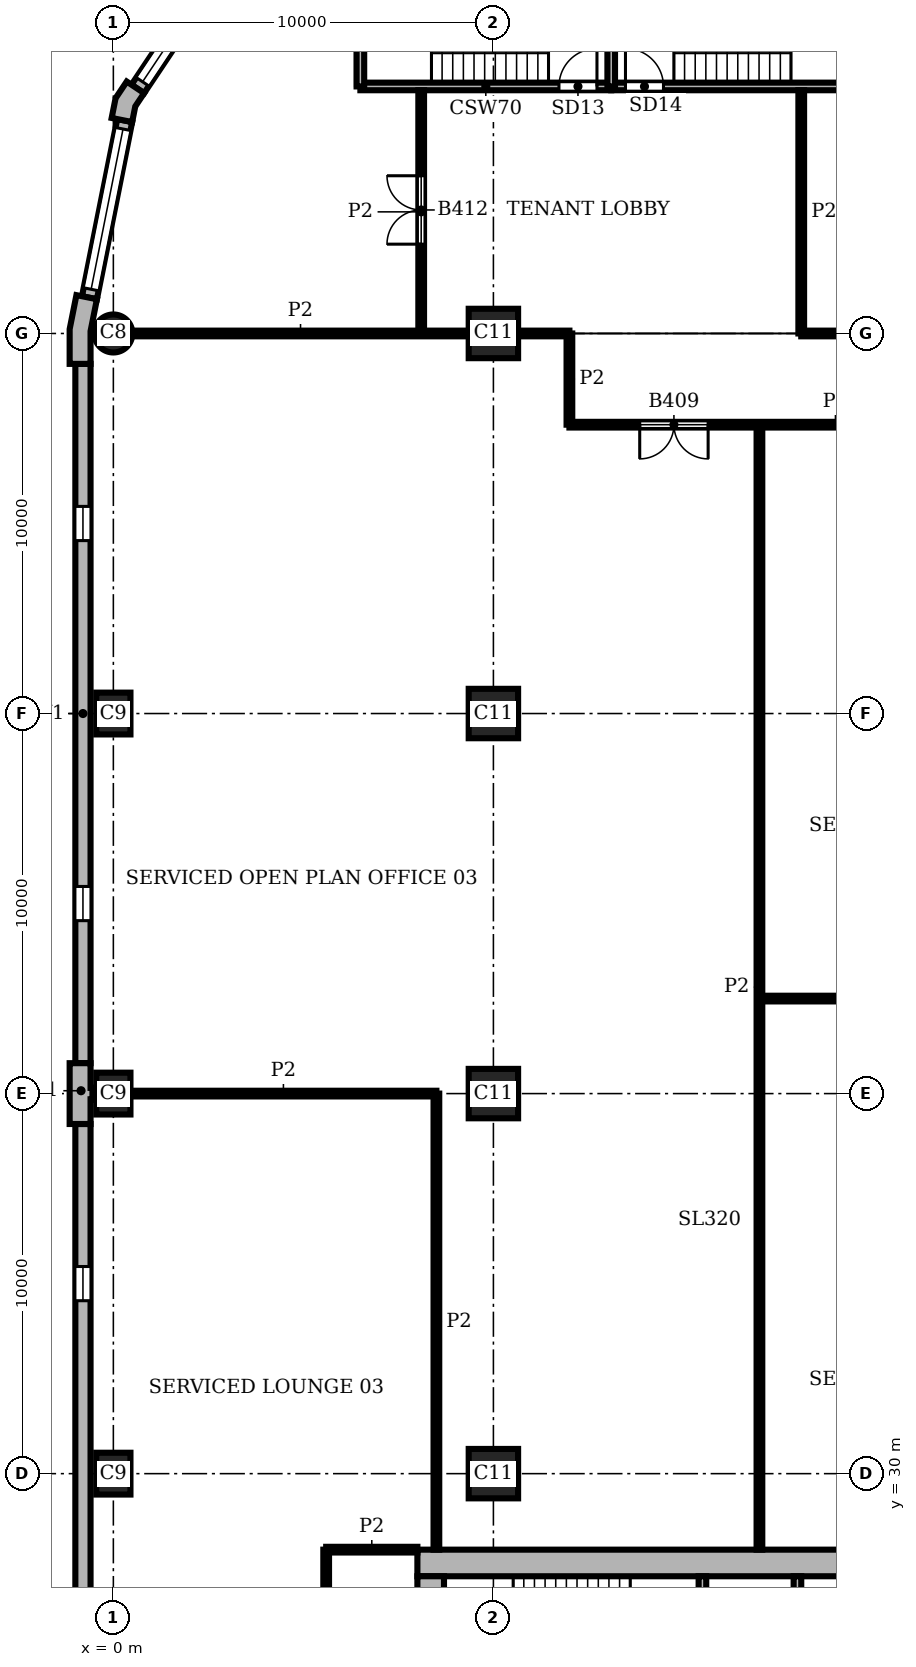
"""IFC4 building model, lengths in metres.
Left out: names, types, materials, properties, quantities, classifications, styles, units other than length and angle.
Written with IfcOpenShell. Run it as: python <this file> out.ifc"""

import sys

from ifc_helpers import new_model, si_unit, direction, frame, frame_2d, origin, origin_2d, place, context, subcontext, project, spatial, polyline, rectangle, circle, outline, extrude, element, fill, save


model = new_model("IFC4")
c1 = context("Model", 3, precision=1e-05, world=origin(), true_north=direction((0.0, 1.0)))
c2 = subcontext(c1, "Body", "Model", "MODEL_VIEW")
j1 = project(units=[si_unit("LENGTHUNIT", "METRE"), si_unit("PLANEANGLEUNIT", "RADIAN")], contexts=[c1])
p1 = place(None, origin())
s1 = spatial("IfcSite", under=j1, at=p1, CompositionType="ELEMENT")
p2 = place(p1, origin())
s2 = spatial("IfcBuilding", under=s1, at=p2, CompositionType="ELEMENT")
p3 = place(p2, frame((0.0, 0.0, 170.7)))
s3 = spatial("IfcBuildingStorey", under=s2, at=p3, CompositionType="ELEMENT", Elevation=170.7)
p4 = place(p3, frame((0.0, 60.0, 0.0), z_axis=(0.0, 0.0, 1.0), x_axis=(1.0, 0.0, 0.0)))
e1 = element("IfcColumn", 1, at=p4, inside=s3, PredefinedType="COLUMN", context=c2, shape_type="SweptSolid", body=[
    extrude(circle(Radius=0.5, at=origin_2d()), origin(), (0.0, 0.0, 1.0), 3.9),
])
for number, where, z_axis, x_axis in (
    (2, (0.0, 50.0, 0.0), (0.0, 0.0, 1.0), (0.0, 1.0, 0.0)),
    (3, (0.0, 40.0, 0.0), (0.0, 0.0, 1.0), (0.0, 1.0, 0.0)),
    (4, (0.0, 30.0, 0.0), (0.0, 0.0, 1.0), (0.0, 1.0, 0.0)),
):
    element("IfcColumn", number, at=place(p3, frame(where, z_axis=z_axis, x_axis=x_axis)), inside=s3, PredefinedType="COLUMN", context=c2, shape_type="SweptSolid", body=[
        extrude(rectangle(XDim=1.1, YDim=0.9, at=origin_2d()), origin(), (0.0, 0.0, 1.0), 3.9),
    ])
for number, where, z_axis, x_axis in (
    (5, (10.0, 30.0, 0.0), (0.0, 0.0, 1.0), (1.0, 0.0, 0.0)),
    (6, (10.0, 40.0, 0.0), (0.0, 0.0, 1.0), (1.0, 0.0, 0.0)),
    (7, (10.0, 50.0, 0.0), (0.0, 0.0, 1.0), (1.0, 0.0, 0.0)),
    (8, (10.0, 60.0, 0.0), (0.0, 0.0, 1.0), (1.0, 0.0, 0.0)),
):
    element("IfcColumn", number, at=place(p3, frame(where, z_axis=z_axis, x_axis=x_axis)), inside=s3, PredefinedType="COLUMN", context=c2, shape_type="SweptSolid", body=[
        extrude(rectangle(XDim=1.3, YDim=1.3, at=origin_2d()), origin(), (0.0, 0.0, 1.0), 3.9),
    ])
p5 = place(p3, frame((28.0, 27.65, 0.0), z_axis=(0.0, 0.0, 1.0), x_axis=(-1.0, 0.0, 0.0)))
e9 = element("IfcWall", 9, at=p5, inside=s3, PredefinedType="SHEAR", context=c2, shape_type="SweptSolid", body=[
    extrude(rectangle(XDim=20.0, YDim=0.7, at=frame_2d((10.0, 0.0))), origin(), (0.0, 0.0, 1.0), 3.9),
])
p6 = place(p3, frame((8.35, 27.3, 0.0), z_axis=(0.0, 0.0, 1.0), x_axis=(0.0, -1.0, 0.0)))
e10 = element("IfcWall", 10, at=p6, inside=s3, PredefinedType="SHEAR", context=c2, shape_type="SweptSolid", body=[
    extrude(rectangle(XDim=18.6, YDim=0.7, at=frame_2d((9.3, 0.0))), origin(), (0.0, 0.0, 1.0), 3.9),
])
p7 = place(p3, origin())
e11 = element("IfcWall", 11, at=p7, inside=s3, PredefinedType="SOLIDWALL", context=c2, shape_type="SweptSolid", body=[
    extrude(outline(polyline([(0.477, 66.545), (0.352, 66.629), (0.059, 66.189), (-0.045, 65.67), (0.103, 65.641), (0.495, 65.563), (0.577, 65.974), (0.81, 66.323), (0.477, 66.545)])), origin(), (0.0, 0.0, 1.0), 3.9),
])
e12 = element("IfcWall", 12, at=p7, inside=s3, PredefinedType="SOLIDWALL", context=c2, shape_type="SweptSolid", body=[
    extrude(outline(polyline([(-0.825, 60.98), (-0.972, 61.009), (-1.15, 60.113), (-1.15, 59.2), (-1.0, 59.2), (-0.6, 59.2), (-0.6, 60.059), (-0.432, 60.902), (-0.825, 60.98)])), origin(), (0.0, 0.0, 1.0), 3.9),
])
e13 = element("IfcWall", 13, at=p7, inside=s3, PredefinedType="SOLIDWALL", context=c2, shape_type="SweptSolid", body=[
    extrude(outline(polyline([(-0.6, 39.2), (-0.6, 39.85), (-0.55, 39.85), (-0.55, 40.15), (-0.6, 40.15), (-0.6, 40.8), (-1.0, 40.8), (-1.15, 40.8), (-1.15, 40.0), (-1.15, 39.2), (-1.0, 39.2), (-0.6, 39.2)])), origin(), (0.0, 0.0, 1.0), 3.9),
])
p8 = place(p3, frame((3.284, 70.386, 0.0), z_axis=(0.0, 0.0, 1.0), x_axis=(-0.555541552266, -0.831488775454, 0.0)))
e14 = element("IfcWall", 14, at=p8, inside=s3, PredefinedType="SOLIDWALL", context=c2, shape_type="SweptSolid", body=[
    extrude(rectangle(XDim=4.753, YDim=0.4, at=frame_2d((2.376, 0.0))), origin(), (0.0, 0.0, 1.0), 3.9),
])
p9 = place(p8, frame((0.226, 0.0, 0.9)))
e15 = element("IfcOpeningElement", 15, at=p9, cuts=e14, PredefinedType="OPENING", context=c2, shape_type="SweptSolid", body=[
    extrude(rectangle(XDim=4.3, YDim=2.35, at=frame_2d((2.15, 1.175))), frame((0.0, 0.21, 0.0), z_axis=(0.0, -1.0, 0.0), x_axis=(1.0, 0.0, 0.0)), (0.0, 0.0, 1.0), 0.42),
])
p10 = place(p3, frame((0.299, 65.602, 0.0), z_axis=(0.0, 0.0, 1.0), x_axis=(-0.195098533057, -0.98078364709, 0.0)))
e16 = element("IfcWall", 16, at=p10, inside=s3, PredefinedType="SOLIDWALL", context=c2, shape_type="SweptSolid", body=[
    extrude(rectangle(XDim=4.753, YDim=0.4, at=frame_2d((2.376, 0.0))), origin(), (0.0, 0.0, 1.0), 3.9),
])
p11 = place(p10, frame((0.226, 0.0, 0.9)))
e17 = element("IfcOpeningElement", 17, at=p11, cuts=e16, PredefinedType="OPENING", context=c2, shape_type="SweptSolid", body=[
    extrude(rectangle(XDim=4.3, YDim=2.35, at=frame_2d((2.15, 1.175))), frame((0.0, 0.21, 0.0), z_axis=(0.0, -1.0, 0.0), x_axis=(1.0, 0.0, 0.0)), (0.0, 0.0, 1.0), 0.42),
])
p12 = place(p3, frame((-0.8, 59.2, 0.0), z_axis=(0.0, 0.0, 1.0), x_axis=(0.0, -1.0, 0.0)))
e18 = element("IfcWall", 18, at=p12, inside=s3, PredefinedType="SOLIDWALL", context=c2, shape_type="SweptSolid", body=[
    extrude(rectangle(XDim=18.4, YDim=0.4, at=frame_2d((9.2, 0.0))), origin(), (0.0, 0.0, 1.0), 3.9),
])
p13 = place(p12, frame((3.75, 0.0, 0.9)))
e19 = element("IfcOpeningElement", 19, at=p13, cuts=e18, PredefinedType="OPENING", context=c2, shape_type="SweptSolid", body=[
    extrude(rectangle(XDim=0.9, YDim=2.35, at=frame_2d((0.45, 1.175))), frame((0.0, 0.21, 0.0), z_axis=(0.0, -1.0, 0.0), x_axis=(1.0, 0.0, 0.0)), (0.0, 0.0, 1.0), 0.42),
])
p14 = place(p12, frame((13.75, 0.0, 0.9)))
e20 = element("IfcOpeningElement", 20, at=p14, cuts=e18, PredefinedType="OPENING", context=c2, shape_type="SweptSolid", body=[
    extrude(rectangle(XDim=0.9, YDim=2.35, at=frame_2d((0.45, 1.175))), frame((0.0, 0.21, 0.0), z_axis=(0.0, -1.0, 0.0), x_axis=(1.0, 0.0, 0.0)), (0.0, 0.0, 1.0), 0.42),
])
p15 = place(p3, frame((-0.8, 39.2, 0.0), z_axis=(0.0, 0.0, 1.0), x_axis=(0.0, -1.0, 0.0)))
e21 = element("IfcWall", 21, at=p15, inside=s3, PredefinedType="SOLIDWALL", context=c2, shape_type="SweptSolid", body=[
    extrude(rectangle(XDim=18.4, YDim=0.4, at=frame_2d((9.2, 0.0))), origin(), (0.0, 0.0, 1.0), 3.9),
])
p16 = place(p15, frame((3.75, 0.0, 0.9)))
e22 = element("IfcOpeningElement", 22, at=p16, cuts=e21, PredefinedType="OPENING", context=c2, shape_type="SweptSolid", body=[
    extrude(rectangle(XDim=0.9, YDim=2.35, at=frame_2d((0.45, 1.175))), frame((0.0, 0.21, 0.0), z_axis=(0.0, -1.0, 0.0), x_axis=(1.0, 0.0, 0.0)), (0.0, 0.0, 1.0), 0.42),
])
p17 = place(p15, frame((13.75, 0.0, 0.9)))
e23 = element("IfcOpeningElement", 23, at=p17, cuts=e21, PredefinedType="OPENING", context=c2, shape_type="SweptSolid", body=[
    extrude(rectangle(XDim=0.9, YDim=2.35, at=frame_2d((0.45, 1.175))), frame((0.0, 0.21, 0.0), z_axis=(0.0, -1.0, 0.0), x_axis=(1.0, 0.0, 0.0)), (0.0, 0.0, 1.0), 0.42),
])
p18 = place(p3, frame((6.5, 66.5, 0.0), z_axis=(0.0, 0.0, 1.0), x_axis=(1.0, 0.0, 0.0)))
e24 = element("IfcWall", 24, at=p18, inside=s3, PredefinedType="SHEAR", context=c2, shape_type="SweptSolid", body=[
    extrude(rectangle(XDim=6.6, YDim=0.2, at=frame_2d((3.3, 0.0))), origin(), (0.0, 0.0, 1.0), 3.58),
])
p19 = place(p18, frame((5.225, 0.0, 0.0)))
e25 = element("IfcOpeningElement", 25, at=p19, cuts=e24, PredefinedType="OPENING", context=c2, shape_type="SweptSolid", body=[
    extrude(rectangle(XDim=1.0, YDim=2.1, at=frame_2d((0.5, 1.05))), frame((0.0, 0.11, 0.0), z_axis=(0.0, -1.0, 0.0), x_axis=(1.0, 0.0, 0.0)), (0.0, 0.0, 1.0), 0.22),
])
p20 = place(p3, frame((13.1, 66.5, 0.0), z_axis=(0.0, 0.0, 1.0), x_axis=(1.0, 0.0, 0.0)))
e26 = element("IfcWall", 26, at=p20, inside=s3, PredefinedType="SHEAR", context=c2, shape_type="SweptSolid", body=[
    extrude(rectangle(XDim=6.6, YDim=0.2, at=frame_2d((3.3, 0.0))), origin(), (0.0, 0.0, 1.0), 3.58),
])
p21 = place(p20, frame((0.375, 0.0, 0.0)))
e27 = element("IfcOpeningElement", 27, at=p21, cuts=e26, PredefinedType="OPENING", context=c2, shape_type="SweptSolid", body=[
    extrude(rectangle(XDim=1.0, YDim=2.1, at=frame_2d((0.5, 1.05))), frame((0.0, 0.11, 0.0), z_axis=(0.0, -1.0, 0.0), x_axis=(1.0, 0.0, 0.0)), (0.0, 0.0, 1.0), 0.22),
])
for number, where, z_axis, x_axis in (
    (28, (6.5, 66.5, 0.0), (0.0, 0.0, 1.0), (0.0, 1.0, 0.0)),
    (29, (13.1, 66.5, 0.0), (0.0, 0.0, 1.0), (0.0, 1.0, 0.0)),
):
    element("IfcWall", number, at=place(p3, frame(where, z_axis=z_axis, x_axis=x_axis)), inside=s3, PredefinedType="SHEAR", context=c2, shape_type="SweptSolid", body=[
        extrude(rectangle(XDim=3.3, YDim=0.2, at=frame_2d((1.65, 0.0))), origin(), (0.0, 0.0, 1.0), 3.58),
    ])
p22 = place(p3, frame((15.5, 23.6, 0.0), z_axis=(0.0, 0.0, 1.0), x_axis=(0.0, 1.0, 0.0)))
e30 = element("IfcWall", 30, at=p22, inside=s3, PredefinedType="SHEAR", context=c2, shape_type="SweptSolid", body=[
    extrude(rectangle(XDim=3.7, YDim=0.2, at=frame_2d((1.85, 0.0))), origin(), (0.0, 0.0, 1.0), 3.58),
])
p23 = place(p3, frame((18.0, 20.0, 0.0), z_axis=(0.0, 0.0, 1.0), x_axis=(0.0, 1.0, 0.0)))
e31 = element("IfcWall", 31, at=p23, inside=s3, PredefinedType="SHEAR", context=c2, shape_type="SweptSolid", body=[
    extrude(rectangle(XDim=7.3, YDim=0.2, at=frame_2d((3.65, 0.0))), origin(), (0.0, 0.0, 1.0), 3.58),
])
p24 = place(p23, frame((1.2, 0.0, 0.0)))
e32 = element("IfcOpeningElement", 32, at=p24, cuts=e31, PredefinedType="OPENING", context=c2, shape_type="SweptSolid", body=[
    extrude(rectangle(XDim=1.2, YDim=2.1, at=frame_2d((0.6, 1.05))), frame((0.0, 0.11, 0.0), z_axis=(0.0, -1.0, 0.0), x_axis=(1.0, 0.0, 0.0)), (0.0, 0.0, 1.0), 0.22),
])
p25 = place(p3, frame((5.6, 5.6, 0.0), z_axis=(0.0, 0.0, 1.0), x_axis=(0.0, 1.0, 0.0)))
e33 = element("IfcWall", 33, at=p25, inside=s3, PredefinedType="PARTITIONING", context=c2, shape_type="SweptSolid", body=[
    extrude(rectangle(XDim=22.4, YDim=0.15, at=frame_2d((11.2, 0.0))), origin(), (0.0, 0.0, 1.0), 3.58),
])
p26 = place(p25, frame((5.35, 0.0, 0.0)))
e34 = element("IfcOpeningElement", 34, at=p26, cuts=e33, PredefinedType="OPENING", context=c2, shape_type="SweptSolid", body=[
    extrude(rectangle(XDim=1.0, YDim=2.1, at=frame_2d((0.5, 1.05))), frame((0.0, 0.085, 0.0), z_axis=(0.0, -1.0, 0.0), x_axis=(1.0, 0.0, 0.0)), (0.0, 0.0, 1.0), 0.17),
])
p27 = place(p25, frame((11.25, 0.0, 0.0)))
e35 = element("IfcOpeningElement", 35, at=p27, cuts=e33, PredefinedType="OPENING", context=c2, shape_type="SweptSolid", body=[
    extrude(rectangle(XDim=1.0, YDim=2.1, at=frame_2d((0.5, 1.05))), frame((0.0, 0.085, 0.0), z_axis=(0.0, -1.0, 0.0), x_axis=(1.0, 0.0, 0.0)), (0.0, 0.0, 1.0), 0.17),
])
p28 = place(p25, frame((18.25, 0.0, 0.0)))
e36 = element("IfcOpeningElement", 36, at=p28, cuts=e33, PredefinedType="OPENING", context=c2, shape_type="SweptSolid", body=[
    extrude(rectangle(XDim=1.8, YDim=2.1, at=frame_2d((0.9, 1.05))), frame((0.0, 0.085, 0.0), z_axis=(0.0, -1.0, 0.0), x_axis=(1.0, 0.0, 0.0)), (0.0, 0.0, 1.0), 0.17),
])
p29 = place(p3, frame((8.1, 60.0, 0.0), z_axis=(0.0, 0.0, 1.0), x_axis=(0.0, 1.0, 0.0)))
e37 = element("IfcWall", 37, at=p29, inside=s3, PredefinedType="PARTITIONING", context=c2, shape_type="SweptSolid", body=[
    extrude(rectangle(XDim=6.4, YDim=0.15, at=frame_2d((3.2, 0.0))), origin(), (0.0, 0.0, 1.0), 3.58),
])
p30 = place(p29, frame((2.35, 0.0, 0.0)))
e38 = element("IfcOpeningElement", 38, at=p30, cuts=e37, PredefinedType="OPENING", context=c2, shape_type="SweptSolid", body=[
    extrude(rectangle(XDim=1.8, YDim=2.1, at=frame_2d((0.9, 1.05))), frame((0.0, 0.085, 0.0), z_axis=(0.0, -1.0, 0.0), x_axis=(1.0, 0.0, 0.0)), (0.0, 0.0, 1.0), 0.17),
])
p31 = place(p3, frame((8.5, 28.0, 0.0), z_axis=(0.0, 0.0, 1.0), x_axis=(0.0, 1.0, 0.0)))
e39 = element("IfcWall", 39, at=p31, inside=s3, PredefinedType="PARTITIONING", context=c2, shape_type="SweptSolid", body=[
    extrude(rectangle(XDim=12.0, YDim=0.15, at=frame_2d((6.0, 0.0))), origin(), (0.0, 0.0, 1.0), 3.58),
])
p32 = place(p3, frame((12.0, 57.6, 0.0), z_axis=(0.0, 0.0, 1.0), x_axis=(0.0, 1.0, 0.0)))
e40 = element("IfcWall", 40, at=p32, inside=s3, PredefinedType="PARTITIONING", context=c2, shape_type="SweptSolid", body=[
    extrude(rectangle(XDim=2.4, YDim=0.15, at=frame_2d((1.2, 0.0))), origin(), (0.0, 0.0, 1.0), 3.58),
])
p33 = place(p3, frame((17.0, 28.0, 0.0), z_axis=(0.0, 0.0, 1.0), x_axis=(0.0, 1.0, 0.0)))
e41 = element("IfcWall", 41, at=p33, inside=s3, PredefinedType="PARTITIONING", context=c2, shape_type="SweptSolid", body=[
    extrude(rectangle(XDim=29.6, YDim=0.15, at=frame_2d((14.8, 0.0))), origin(), (0.0, 0.0, 1.0), 3.58),
])
p34 = place(p3, frame((18.1, 60.0, 0.0), z_axis=(0.0, 0.0, 1.0), x_axis=(0.0, 1.0, 0.0)))
e42 = element("IfcWall", 42, at=p34, inside=s3, PredefinedType="PARTITIONING", context=c2, shape_type="SweptSolid", body=[
    extrude(rectangle(XDim=6.4, YDim=0.15, at=frame_2d((3.2, 0.0))), origin(), (0.0, 0.0, 1.0), 3.58),
])
p35 = place(p3, frame((5.6, 28.0, 0.0), z_axis=(0.0, 0.0, 1.0), x_axis=(1.0, 0.0, 0.0)))
e43 = element("IfcWall", 43, at=p35, inside=s3, PredefinedType="PARTITIONING", context=c2, shape_type="SweptSolid", body=[
    extrude(rectangle(XDim=2.4, YDim=0.15, at=frame_2d((1.2, 0.0))), origin(), (0.0, 0.0, 1.0), 3.58),
])
p36 = place(p3, frame((0.45, 40.0, 0.0), z_axis=(0.0, 0.0, 1.0), x_axis=(1.0, 0.0, 0.0)))
e44 = element("IfcWall", 44, at=p36, inside=s3, PredefinedType="PARTITIONING", context=c2, shape_type="SweptSolid", body=[
    extrude(rectangle(XDim=8.05, YDim=0.15, at=frame_2d((4.025, 0.0))), origin(), (0.0, 0.0, 1.0), 3.58),
])
p37 = place(p3, frame((17.0, 42.5, 0.0), z_axis=(0.0, 0.0, 1.0), x_axis=(1.0, 0.0, 0.0)))
e45 = element("IfcWall", 45, at=p37, inside=s3, PredefinedType="PARTITIONING", context=c2, shape_type="SweptSolid", body=[
    extrude(rectangle(XDim=9.0, YDim=0.15, at=frame_2d((4.5, 0.0))), origin(), (0.0, 0.0, 1.0), 3.58),
])
p38 = place(p3, frame((12.0, 57.6, 0.0), z_axis=(0.0, 0.0, 1.0), x_axis=(1.0, 0.0, 0.0)))
e46 = element("IfcWall", 46, at=p38, inside=s3, PredefinedType="PARTITIONING", context=c2, shape_type="SweptSolid", body=[
    extrude(rectangle(XDim=14.0, YDim=0.15, at=frame_2d((7.0, 0.0))), origin(), (0.0, 0.0, 1.0), 3.58),
])
p39 = place(p38, frame((1.85, 0.0, 0.0)))
e47 = element("IfcOpeningElement", 47, at=p39, cuts=e46, PredefinedType="OPENING", context=c2, shape_type="SweptSolid", body=[
    extrude(rectangle(XDim=1.8, YDim=2.1, at=frame_2d((0.9, 1.05))), frame((0.0, 0.085, 0.0), z_axis=(0.0, -1.0, 0.0), x_axis=(1.0, 0.0, 0.0)), (0.0, 0.0, 1.0), 0.17),
])
p40 = place(p3, frame((0.5, 60.0, 0.0), z_axis=(0.0, 0.0, 1.0), x_axis=(1.0, 0.0, 0.0)))
e48 = element("IfcWall", 48, at=p40, inside=s3, PredefinedType="PARTITIONING", context=c2, shape_type="SweptSolid", body=[
    extrude(rectangle(XDim=8.85, YDim=0.15, at=frame_2d((4.425, 0.0))), origin(), (0.0, 0.0, 1.0), 3.58),
])
p41 = place(p3, frame((10.65, 60.0, 0.0), z_axis=(0.0, 0.0, 1.0), x_axis=(1.0, 0.0, 0.0)))
e49 = element("IfcWall", 49, at=p41, inside=s3, PredefinedType="PARTITIONING", context=c2, shape_type="SweptSolid", body=[
    extrude(rectangle(XDim=1.35, YDim=0.15, at=frame_2d((0.675, 0.0))), origin(), (0.0, 0.0, 1.0), 3.58),
])
p42 = place(p3, frame((18.1, 60.0, 0.0), z_axis=(0.0, 0.0, 1.0), x_axis=(1.0, 0.0, 0.0)))
e50 = element("IfcWall", 50, at=p42, inside=s3, PredefinedType="PARTITIONING", context=c2, shape_type="SweptSolid", body=[
    extrude(rectangle(XDim=1.25, YDim=0.15, at=frame_2d((0.625, 0.0))), origin(), (0.0, 0.0, 1.0), 3.58),
])
p43 = place(p9, origin())
e51 = element("IfcWindow", 51, at=p43, inside=s3, PartitioningType="SINGLE_PANEL", PredefinedType="WINDOW", context=c2, shape_type="SweptSolid", body=[
    extrude(rectangle(XDim=4.3, YDim=2.35, at=frame_2d((2.15, 1.175))), frame((0.0, 0.16, 0.0), z_axis=(0.0, -1.0, 0.0), x_axis=(1.0, 0.0, 0.0)), (0.0, 0.0, 1.0), 0.06),
])
fill(e15, e51)
p44 = place(p11, origin())
e52 = element("IfcWindow", 52, at=p44, inside=s3, PartitioningType="SINGLE_PANEL", PredefinedType="WINDOW", context=c2, shape_type="SweptSolid", body=[
    extrude(rectangle(XDim=4.3, YDim=2.35, at=frame_2d((2.15, 1.175))), frame((0.0, 0.16, 0.0), z_axis=(0.0, -1.0, 0.0), x_axis=(1.0, 0.0, 0.0)), (0.0, 0.0, 1.0), 0.06),
])
fill(e17, e52)
p45 = place(p13, origin())
e53 = element("IfcWindow", 53, at=p45, inside=s3, PartitioningType="SINGLE_PANEL", PredefinedType="WINDOW", context=c2, shape_type="SweptSolid", body=[
    extrude(rectangle(XDim=0.9, YDim=2.35, at=frame_2d((0.45, 1.175))), frame((0.0, 0.16, 0.0), z_axis=(0.0, -1.0, 0.0), x_axis=(1.0, 0.0, 0.0)), (0.0, 0.0, 1.0), 0.06),
])
fill(e19, e53)
p46 = place(p14, origin())
e54 = element("IfcWindow", 54, at=p46, inside=s3, PartitioningType="SINGLE_PANEL", PredefinedType="WINDOW", context=c2, shape_type="SweptSolid", body=[
    extrude(rectangle(XDim=0.9, YDim=2.35, at=frame_2d((0.45, 1.175))), frame((0.0, 0.16, 0.0), z_axis=(0.0, -1.0, 0.0), x_axis=(1.0, 0.0, 0.0)), (0.0, 0.0, 1.0), 0.06),
])
fill(e20, e54)
p47 = place(p16, origin())
e55 = element("IfcWindow", 55, at=p47, inside=s3, PartitioningType="SINGLE_PANEL", PredefinedType="WINDOW", context=c2, shape_type="SweptSolid", body=[
    extrude(rectangle(XDim=0.9, YDim=2.35, at=frame_2d((0.45, 1.175))), frame((0.0, 0.16, 0.0), z_axis=(0.0, -1.0, 0.0), x_axis=(1.0, 0.0, 0.0)), (0.0, 0.0, 1.0), 0.06),
])
fill(e22, e55)
p48 = place(p19, origin())
e56 = element("IfcDoor", 56, at=p48, inside=s3, OperationType="SINGLE_SWING_RIGHT", PredefinedType="DOOR", context=c2, shape_type="SweptSolid", body=[
    extrude(rectangle(XDim=1.0, YDim=2.1, at=frame_2d((0.5, 1.05))), frame((0.0, 0.025, 0.0), z_axis=(0.0, -1.0, 0.0), x_axis=(1.0, 0.0, 0.0)), (0.0, 0.0, 1.0), 0.05),
])
fill(e25, e56)
p49 = place(p21, origin())
e57 = element("IfcDoor", 57, at=p49, inside=s3, OperationType="SINGLE_SWING_LEFT", PredefinedType="DOOR", context=c2, shape_type="SweptSolid", body=[
    extrude(rectangle(XDim=1.0, YDim=2.1, at=frame_2d((0.5, 1.05))), frame((0.0, 0.025, 0.0), z_axis=(0.0, -1.0, 0.0), x_axis=(1.0, 0.0, 0.0)), (0.0, 0.0, 1.0), 0.05),
])
fill(e27, e57)
p50 = place(p39, frame((1.8, 0.0, 0.0), z_axis=(0.0, 0.0, 1.0), x_axis=(-1.0, 0.0, 0.0)))
e58 = element("IfcDoor", 58, at=p50, inside=s3, OperationType="DOUBLE_DOOR_SINGLE_SWING", PredefinedType="DOOR", context=c2, shape_type="SweptSolid", body=[
    extrude(rectangle(XDim=1.8, YDim=2.1, at=frame_2d((0.9, 1.05))), frame((0.0, 0.025, 0.0), z_axis=(0.0, -1.0, 0.0), x_axis=(1.0, 0.0, 0.0)), (0.0, 0.0, 1.0), 0.05),
])
fill(e47, e58)
p51 = place(p30, origin())
e59 = element("IfcDoor", 59, at=p51, inside=s3, OperationType="DOUBLE_DOOR_SINGLE_SWING", PredefinedType="DOOR", context=c2, shape_type="SweptSolid", body=[
    extrude(rectangle(XDim=1.8, YDim=2.1, at=frame_2d((0.9, 1.05))), frame((0.0, 0.025, 0.0), z_axis=(0.0, -1.0, 0.0), x_axis=(1.0, 0.0, 0.0)), (0.0, 0.0, 1.0), 0.05),
])
fill(e38, e59)
save(model, sys.argv[1])
